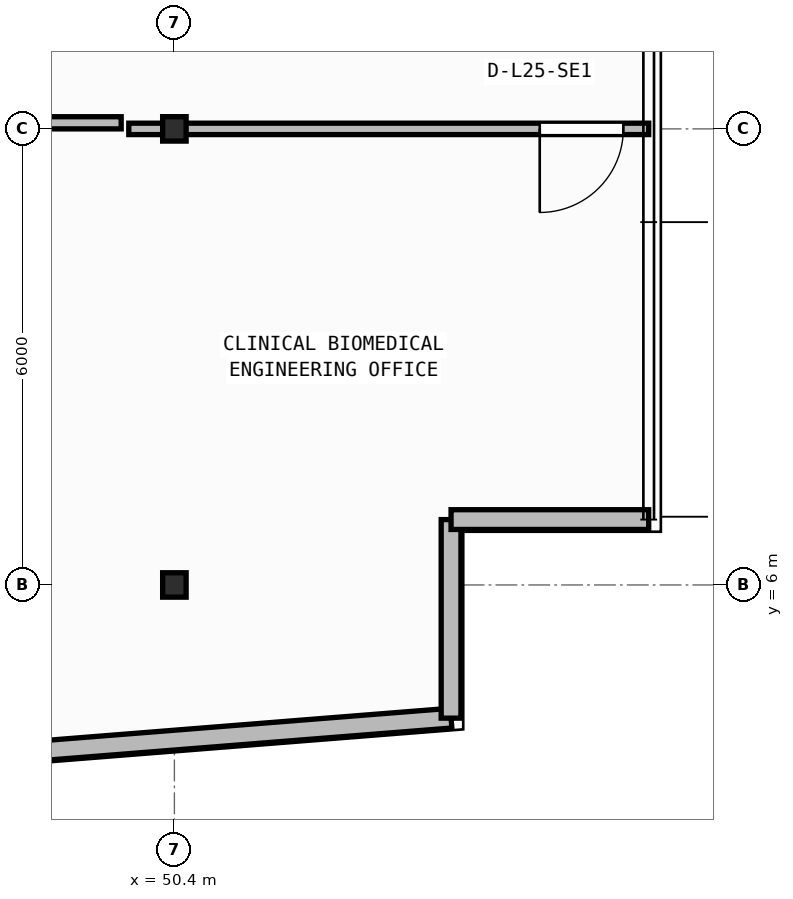
"""IFC4 building model, lengths in metres.
Left out: names, types, materials, properties, quantities, classifications, styles, units other than length and angle.
Written with IfcOpenShell. Run it as: python <this file> out.ifc"""

import sys

from ifc_helpers import new_model, si_unit, direction, frame, frame_2d, origin, origin_2d, place, context, subcontext, project, spatial, rectangle, i_section, extrude, element, fill, save


model = new_model("IFC4")
c1 = context("Model", 3, precision=1e-05, world=origin(), true_north=direction((0.0, 1.0)))
c2 = subcontext(c1, "Body", "Model", "MODEL_VIEW")
j1 = project(units=[si_unit("LENGTHUNIT", "METRE"), si_unit("PLANEANGLEUNIT", "RADIAN")], contexts=[c1])
p1 = place(None, origin())
s1 = spatial("IfcSite", under=j1, at=p1, CompositionType="ELEMENT")
p2 = place(p1, origin())
s2 = spatial("IfcBuilding", under=s1, at=p2, CompositionType="ELEMENT")
p3 = place(p2, frame((0.0, 0.0, 103.35)))
s3 = spatial("IfcBuildingStorey", under=s2, at=p3, CompositionType="ELEMENT", Elevation=103.35)
for number, where, z_axis, x_axis in (
    (1, (50.4, 6.0, 0.0), (0.0, 0.0, 1.0), (1.0, 0.0, 0.0)),
    (2, (50.4, 12.0, 0.0), (0.0, 0.0, 1.0), (1.0, 0.0, 0.0)),
):
    element("IfcColumn", number, at=place(p3, frame(where, z_axis=z_axis, x_axis=x_axis)), inside=s3, PredefinedType="COLUMN", context=c2, shape_type="SweptSolid", body=[
        extrude(i_section(OverallWidth=0.309, OverallDepth=0.321, WebThickness=0.014, FlangeThickness=0.022, FilletRadius=0.017, at=origin_2d()), origin(), (0.0, 0.0, 1.0), 3.95),
    ])
p4 = place(p3, frame((2.76, 0.173, 0.0), z_axis=(0.0, 0.0, 1.0), x_axis=(0.996857931723, 0.079210251617, 0.0)))
e3 = element("IfcWall", 3, at=p4, inside=s3, PredefinedType="STANDARD", context=c2, shape_type="SweptSolid", body=[
    extrude(rectangle(XDim=51.442, YDim=0.26, at=frame_2d((25.721, 0.0))), origin(), (0.0, 0.0, 1.0), 3.71),
])
p5 = place(p4, frame((24.521, 0.0, 0.9)))
e4 = element("IfcOpeningElement", 4, at=p5, cuts=e3, PredefinedType="OPENING", context=c2, shape_type="SweptSolid", body=[
    extrude(rectangle(XDim=2.4, YDim=1.65, at=frame_2d((1.2, 0.825))), frame((0.0, 0.14, 0.0), z_axis=(0.0, -1.0, 0.0), x_axis=(1.0, 0.0, 0.0)), (0.0, 0.0, 1.0), 0.28),
])
p6 = place(p3, frame((54.04, 4.248, 0.0), z_axis=(0.0, 0.0, 1.0), x_axis=(0.0, 1.0, 0.0)))
e5 = element("IfcWall", 5, at=p6, inside=s3, PredefinedType="STANDARD", context=c2, shape_type="SweptSolid", body=[
    extrude(rectangle(XDim=2.612, YDim=0.26, at=frame_2d((1.306, 0.0))), origin(), (0.0, 0.0, 1.0), 3.71),
])
p7 = place(p3, frame((54.04, 6.86, 0.0), z_axis=(0.0, 0.0, 1.0), x_axis=(1.0, 0.0, 0.0)))
e6 = element("IfcWall", 6, at=p7, inside=s3, PredefinedType="STANDARD", context=c2, shape_type="SweptSolid", body=[
    extrude(rectangle(XDim=2.6, YDim=0.26, at=frame_2d((1.3, 0.0))), origin(), (0.0, 0.0, 1.0), 3.71),
])
p8 = place(p3, frame((56.64, 12.0, 0.0), z_axis=(0.0, 0.0, 1.0), x_axis=(-1.0, 0.0, 0.0)))
e7 = element("IfcWall", 7, at=p8, inside=s3, PredefinedType="PARTITIONING", context=c2, shape_type="SweptSolid", body=[
    extrude(rectangle(XDim=6.84, YDim=0.15, at=frame_2d((3.42, 0.0))), origin(), (0.0, 0.0, 1.0), 3.083),
])
p9 = place(p8, frame((0.333, 0.0, 0.0)))
e8 = element("IfcOpeningElement", 8, at=p9, cuts=e7, PredefinedType="OPENING", context=c2, shape_type="SweptSolid", body=[
    extrude(rectangle(XDim=1.1, YDim=2.1, at=frame_2d((0.55, 1.05))), frame((0.0, 0.085, 0.0), z_axis=(0.0, -1.0, 0.0), x_axis=(1.0, 0.0, 0.0)), (0.0, 0.0, 1.0), 0.17),
])
p10 = place(p3, frame((46.689, 12.08, 0.0), z_axis=(0.0, 0.0, 1.0), x_axis=(1.0, 0.0, 0.0)))
e9 = element("IfcWall", 9, at=p10, inside=s3, PredefinedType="PARTITIONING", context=c2, shape_type="SweptSolid", body=[
    extrude(rectangle(XDim=3.011, YDim=0.16, at=frame_2d((1.505, 0.0))), origin(), (0.0, 0.0, 1.0), 3.083),
])
p11 = place(p9, origin())
e10 = element("IfcDoor", 10, at=p11, inside=s3, OperationType="SINGLE_SWING_RIGHT", PredefinedType="DOOR", context=c2, shape_type="SweptSolid", body=[
    extrude(rectangle(XDim=1.1, YDim=2.1, at=frame_2d((0.55, 1.05))), frame((0.0, 0.025, 0.0), z_axis=(0.0, -1.0, 0.0), x_axis=(1.0, 0.0, 0.0)), (0.0, 0.0, 1.0), 0.05),
])
fill(e8, e10)
save(model, sys.argv[1])
